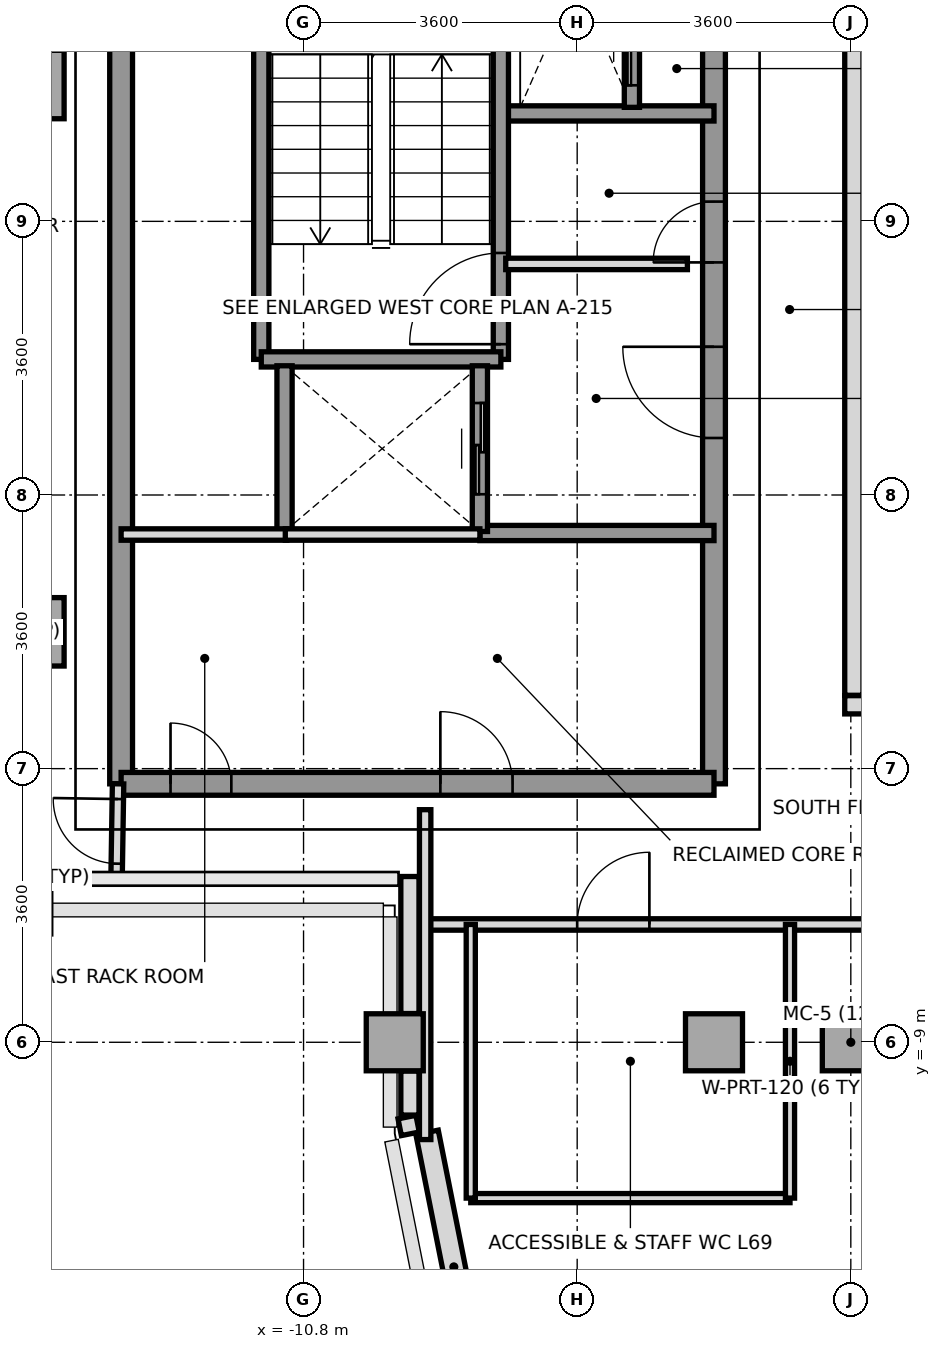
"""IFC4 building model, lengths in metres.
Left out: names, types, materials, properties, quantities, classifications, styles, units other than length and angle.
Written with IfcOpenShell. Run it as: python <this file> out.ifc"""

import sys

from ifc_helpers import new_model, si_unit, direction, frame, frame_2d, origin, origin_2d, place, context, subcontext, project, spatial, rectangle, extrude, source, transform, mapped, element, fill, save


model = new_model("IFC4")
c1 = context("Model", 3, precision=1e-05, world=origin(), true_north=direction((0.0, 1.0)))
c2 = subcontext(c1, "Body", "Model", "MODEL_VIEW")
j1 = project(units=[si_unit("LENGTHUNIT", "METRE"), si_unit("PLANEANGLEUNIT", "RADIAN")], contexts=[c1])
p1 = place(None, origin())
s1 = spatial("IfcSite", under=j1, at=p1, CompositionType="ELEMENT")
p2 = place(p1, origin())
s2 = spatial("IfcBuilding", under=s1, at=p2, CompositionType="ELEMENT")
p3 = place(p2, frame((0.0, 0.0, 249.2)))
s3 = spatial("IfcBuildingStorey", under=s2, at=p3, CompositionType="ELEMENT", Elevation=249.2)
m1 = source(origin(), c2, "Body", "SweptSolid", [
    extrude(rectangle(XDim=0.9, YDim=0.9, at=origin_2d()), origin(), (0.0, 0.0, 1.0), 3.01),
])
for number, where, z_axis, x_axis in (
    (1, (-14.4, -3.6, 0.0), (0.0, 0.0, 1.0), (1.0, 0.0, 0.0)),
    (2, (-14.4, 3.6, 0.0), (0.0, 0.0, 1.0), (1.0, 0.0, 0.0)),
):
    element("IfcColumn", number, at=place(p3, frame(where, z_axis=z_axis, x_axis=x_axis)), inside=s3, PredefinedType="COLUMN", context=c2, shape_type="MappedRepresentation", body=[
        mapped(m1, transform((0.0, 0.0, 0.0), x_axis=(1.0, 0.0, 0.0), y_axis=(0.0, 1.0, 0.0), z_axis=(0.0, 0.0, 1.0), scale=1.0)),
    ])
m2 = source(origin(), c2, "Body", "SweptSolid", [
    extrude(rectangle(XDim=0.75, YDim=0.75, at=origin_2d()), origin(), (0.0, 0.0, 1.0), 3.01),
])
for number, where, z_axis, x_axis in (
    (3, (-9.6, -9.0, 0.0), (0.0, 0.0, 1.0), (1.0, 0.0, 0.0)),
    (4, (-5.4, -9.0, 0.0), (0.0, 0.0, 1.0), (1.0, 0.0, 0.0)),
    (5, (-3.6, -9.0, 0.0), (0.0, 0.0, 1.0), (1.0, 0.0, 0.0)),
):
    element("IfcColumn", number, at=place(p3, frame(where, z_axis=z_axis, x_axis=x_axis)), inside=s3, PredefinedType="COLUMN", context=c2, shape_type="MappedRepresentation", body=[
        mapped(m2, transform((0.0, 0.0, 0.0), x_axis=(1.0, 0.0, 0.0), y_axis=(0.0, 1.0, 0.0), z_axis=(0.0, 0.0, 1.0), scale=1.0)),
    ])
p4 = place(p3, frame((-9.175, -10.185, 0.0), z_axis=(0.0, 0.0, 1.0), x_axis=(0.195114232679, -0.980780523974, 0.0)))
e6 = element("IfcWall", 6, at=p4, inside=s3, PredefinedType="SOLIDWALL", context=c2, shape_type="SweptSolid", body=[
    extrude(rectangle(XDim=3.609, YDim=0.3, at=frame_2d((1.804, 0.0))), origin(), (0.0, 0.0, 1.0), 3.01),
])
p5 = place(p3, frame((-9.395, -10.204, 0.0), z_axis=(0.0, 0.0, 1.0), x_axis=(-0.194859894132, 0.980831087221, 0.0)))
e7 = element("IfcWall", 7, at=p5, inside=s3, PredefinedType="PARAPET", context=c2, shape_type="SweptSolid", body=[
    extrude(rectangle(XDim=0.224, YDim=0.24, at=frame_2d((0.112, 0.0))), origin(), (0.0, 0.0, 1.0), 1.15),
])
p6 = place(p3, frame((-9.4, -9.958, 0.0), z_axis=(0.0, 0.0, 1.0), x_axis=(0.0, 1.0, 0.0)))
e8 = element("IfcWall", 8, at=p6, inside=s3, PredefinedType="PARAPET", context=c2, shape_type="SweptSolid", body=[
    extrude(rectangle(XDim=0.58, YDim=0.24, at=frame_2d((0.29, 0.0))), origin(), (0.0, 0.0, 1.0), 1.15),
])
p7 = place(p3, frame((-9.4, -8.622, 0.0), z_axis=(0.0, 0.0, 1.0), x_axis=(0.0, 1.0, 0.0)))
e9 = element("IfcWall", 9, at=p7, inside=s3, PredefinedType="PARAPET", context=c2, shape_type="SweptSolid", body=[
    extrude(rectangle(XDim=1.803, YDim=0.24, at=frame_2d((0.901, 0.0))), origin(), (0.0, 0.0, 1.0), 1.15),
])
p8 = place(p3, frame((-13.2, -5.6, 0.0), z_axis=(0.0, 0.0, 1.0), x_axis=(0.0, 1.0, 0.0)))
e10 = element("IfcWall", 10, at=p8, inside=s3, PredefinedType="SHEAR", context=c2, shape_type="SweptSolid", body=[
    extrude(rectangle(XDim=11.2, YDim=0.3, at=frame_2d((5.6, 0.0))), origin(), (0.0, 0.0, 1.0), 3.01),
])
p9 = place(p3, frame((-5.4, -5.6, 0.0), z_axis=(0.0, 0.0, 1.0), x_axis=(0.0, 1.0, 0.0)))
e11 = element("IfcWall", 11, at=p9, inside=s3, PredefinedType="SHEAR", context=c2, shape_type="SweptSolid", body=[
    extrude(rectangle(XDim=12.5, YDim=0.3, at=frame_2d((6.25, 0.0))), origin(), (0.0, 0.0, 1.0), 3.01),
])
p10 = place(p9, frame((4.55, 0.0, 0.0)))
e12 = element("IfcOpeningElement", 12, at=p10, cuts=e11, PredefinedType="OPENING", context=c2, shape_type="SweptSolid", body=[
    extrude(rectangle(XDim=1.2, YDim=2.2, at=frame_2d((0.6, 1.1))), frame((0.0, 0.16, 0.0), z_axis=(0.0, -1.0, 0.0), x_axis=(1.0, 0.0, 0.0)), (0.0, 0.0, 1.0), 0.32),
])
p11 = place(p9, frame((10.45, 0.0, 0.0)))
e13 = element("IfcOpeningElement", 13, at=p11, cuts=e11, PredefinedType="OPENING", context=c2, shape_type="SweptSolid", body=[
    extrude(rectangle(XDim=1.2, YDim=2.2, at=frame_2d((0.6, 1.1))), frame((0.0, 0.16, 0.0), z_axis=(0.0, -1.0, 0.0), x_axis=(1.0, 0.0, 0.0)), (0.0, 0.0, 1.0), 0.32),
])
p12 = place(p9, frame((6.86, 0.0, 0.0)))
e14 = element("IfcOpeningElement", 14, at=p12, cuts=e11, PredefinedType="OPENING", context=c2, shape_type="SweptSolid", body=[
    extrude(rectangle(XDim=0.8, YDim=2.1, at=frame_2d((0.4, 1.05))), frame((0.0, 0.16, 0.0), z_axis=(0.0, -1.0, 0.0), x_axis=(1.0, 0.0, 0.0)), (0.0, 0.0, 1.0), 0.32),
])
p13 = place(p3, frame((-13.2, -5.6, 0.0), z_axis=(0.0, 0.0, 1.0), x_axis=(1.0, 0.0, 0.0)))
e15 = element("IfcWall", 15, at=p13, inside=s3, PredefinedType="SHEAR", context=c2, shape_type="SweptSolid", body=[
    extrude(rectangle(XDim=7.8, YDim=0.3, at=frame_2d((3.9, 0.0))), origin(), (0.0, 0.0, 1.0), 3.01),
])
p14 = place(p13, frame((0.65, 0.0, 0.0)))
e16 = element("IfcOpeningElement", 16, at=p14, cuts=e15, PredefinedType="OPENING", context=c2, shape_type="SweptSolid", body=[
    extrude(rectangle(XDim=0.8, YDim=2.1, at=frame_2d((0.4, 1.05))), frame((0.0, 0.16, 0.0), z_axis=(0.0, -1.0, 0.0), x_axis=(1.0, 0.0, 0.0)), (0.0, 0.0, 1.0), 0.32),
])
p15 = place(p13, frame((4.2, 0.0, 0.0)))
e17 = element("IfcOpeningElement", 17, at=p15, cuts=e15, PredefinedType="OPENING", context=c2, shape_type="SweptSolid", body=[
    extrude(rectangle(XDim=0.95, YDim=2.15, at=frame_2d((0.475, 1.075))), frame((0.0, 0.16, 0.0), z_axis=(0.0, -1.0, 0.0), x_axis=(1.0, 0.0, 0.0)), (0.0, 0.0, 1.0), 0.32),
])
p16 = place(p3, frame((-8.18, 3.22, 0.0), z_axis=(0.0, 0.0, 1.0), x_axis=(1.0, 0.0, 0.0)))
e18 = element("IfcWall", 18, at=p16, inside=s3, PredefinedType="SOLIDWALL", context=c2, shape_type="SweptSolid", body=[
    extrude(rectangle(XDim=2.78, YDim=0.2, at=frame_2d((1.39, 0.0))), origin(), (0.0, 0.0, 1.0), 3.01),
])
p17 = place(p3, frame((-8.48, -2.3, 0.0), z_axis=(0.0, 0.0, 1.0), x_axis=(1.0, 0.0, 0.0)))
e19 = element("IfcWall", 19, at=p17, inside=s3, PredefinedType="SOLIDWALL", context=c2, shape_type="SweptSolid", body=[
    extrude(rectangle(XDim=3.08, YDim=0.2, at=frame_2d((1.54, 0.0))), origin(), (0.0, 0.0, 1.0), 3.01),
])
p18 = place(p3, frame((-8.204, -0.016, 0.0), z_axis=(0.0, 0.0, 1.0), x_axis=(0.0, 1.0, 0.0)))
e20 = element("IfcWall", 20, at=p18, inside=s3, PredefinedType="SOLIDWALL", context=c2, shape_type="SweptSolid", body=[
    extrude(rectangle(XDim=6.916, YDim=0.2, at=frame_2d((3.458, 0.0))), origin(), (0.0, 0.0, 1.0), 3.01),
])
p19 = place(p18, frame((0.2, 0.0, 0.0)))
e21 = element("IfcOpeningElement", 21, at=p19, cuts=e20, PredefinedType="OPENING", context=c2, shape_type="SweptSolid", body=[
    extrude(rectangle(XDim=1.2, YDim=2.2, at=frame_2d((0.6, 1.1))), frame((0.0, 0.11, 0.0), z_axis=(0.0, -1.0, 0.0), x_axis=(1.0, 0.0, 0.0)), (0.0, 0.0, 1.0), 0.22),
])
p20 = place(p3, frame((-11.356, -0.016, 0.0), z_axis=(0.0, 0.0, 1.0), x_axis=(0.0, 1.0, 0.0)))
e22 = element("IfcWall", 22, at=p20, inside=s3, PredefinedType="SOLIDWALL", context=c2, shape_type="SweptSolid", body=[
    extrude(rectangle(XDim=6.916, YDim=0.2, at=frame_2d((3.458, 0.0))), origin(), (0.0, 0.0, 1.0), 3.01),
])
p21 = place(p3, frame((-11.356, -0.016, 0.0), z_axis=(0.0, 0.0, 1.0), x_axis=(1.0, 0.0, 0.0)))
e23 = element("IfcWall", 23, at=p21, inside=s3, PredefinedType="SOLIDWALL", context=c2, shape_type="SweptSolid", body=[
    extrude(rectangle(XDim=3.152, YDim=0.2, at=frame_2d((1.576, 0.0))), origin(), (0.0, 0.0, 1.0), 3.01),
])
p22 = place(p3, frame((-11.05, -2.28, 0.0), z_axis=(0.0, 0.0, 1.0), x_axis=(0.0, 1.0, 0.0)))
e24 = element("IfcWall", 24, at=p22, inside=s3, PredefinedType="SOLIDWALL", context=c2, shape_type="SweptSolid", body=[
    extrude(rectangle(XDim=2.18, YDim=0.2, at=frame_2d((1.09, 0.0))), origin(), (0.0, 0.0, 1.0), 3.01),
])
p23 = place(p3, frame((-8.48, -2.28, 0.0), z_axis=(0.0, 0.0, 1.0), x_axis=(0.0, 1.0, 0.0)))
e25 = element("IfcWall", 25, at=p23, inside=s3, PredefinedType="SOLIDWALL", context=c2, shape_type="SweptSolid", body=[
    extrude(rectangle(XDim=2.18, YDim=0.2, at=frame_2d((1.09, 0.0))), origin(), (0.0, 0.0, 1.0), 3.01),
])
p24 = place(p23, frame((0.49, 0.0, 0.0)))
e26 = element("IfcOpeningElement", 26, at=p24, cuts=e25, PredefinedType="OPENING", context=c2, shape_type="SweptSolid", body=[
    extrude(rectangle(XDim=1.2, YDim=2.2, at=frame_2d((0.6, 1.1))), frame((0.0, 0.11, 0.0), z_axis=(0.0, -1.0, 0.0), x_axis=(1.0, 0.0, 0.0)), (0.0, 0.0, 1.0), 0.22),
])
p25 = place(p3, frame((-6.48, 3.3, 0.0), z_axis=(0.0, 0.0, 1.0), x_axis=(0.0, 1.0, 0.0)))
e27 = element("IfcWall", 27, at=p25, inside=s3, PredefinedType="SOLIDWALL", context=c2, shape_type="SweptSolid", body=[
    extrude(rectangle(XDim=1.68, YDim=0.2, at=frame_2d((0.84, 0.0))), origin(), (0.0, 0.0, 1.0), 3.01),
])
p26 = place(p25, frame((0.29, 0.0, 0.0)))
e28 = element("IfcOpeningElement", 28, at=p26, cuts=e27, PredefinedType="OPENING", context=c2, shape_type="SweptSolid", body=[
    extrude(rectangle(XDim=1.1, YDim=2.2, at=frame_2d((0.55, 1.1))), frame((0.0, 0.11, 0.0), z_axis=(0.0, -1.0, 0.0), x_axis=(1.0, 0.0, 0.0)), (0.0, 0.0, 1.0), 0.22),
])
p27 = place(p3, frame((-8.14, 1.24, 0.0), z_axis=(0.0, 0.0, 1.0), x_axis=(1.0, 0.0, 0.0)))
e29 = element("IfcWall", 29, at=p27, inside=s3, PredefinedType="PARTITIONING", context=c2, shape_type="SweptSolid", body=[
    extrude(rectangle(XDim=2.39, YDim=0.15, at=frame_2d((1.195, 0.0))), origin(), (0.0, 0.0, 1.0), 3.01),
])
p28 = place(p3, frame((-13.2, -2.32, 0.0), z_axis=(0.0, 0.0, 1.0), x_axis=(1.0, 0.0, 0.0)))
e30 = element("IfcWall", 30, at=p28, inside=s3, PredefinedType="PARTITIONING", context=c2, shape_type="SweptSolid", body=[
    extrude(rectangle(XDim=2.18, YDim=0.15, at=frame_2d((1.09, 0.0))), origin(), (0.0, 0.0, 1.0), 3.01),
])
p29 = place(p3, frame((-11.04, -2.32, 0.0), z_axis=(0.0, 0.0, 1.0), x_axis=(1.0, 0.0, 0.0)))
e31 = element("IfcWall", 31, at=p29, inside=s3, PredefinedType="PARTITIONING", context=c2, shape_type="SweptSolid", body=[
    extrude(rectangle(XDim=2.56, YDim=0.15, at=frame_2d((1.28, 0.0))), origin(), (0.0, 0.0, 1.0), 3.01),
])
p30 = place(p3, frame((-9.2, -7.45, 0.0), z_axis=(0.0, 0.0, 1.0), x_axis=(1.0, 0.0, 0.0)))
e32 = element("IfcWall", 32, at=p30, inside=s3, PredefinedType="PARTITIONING", context=c2, shape_type="SweptSolid", body=[
    extrude(rectangle(XDim=18.4, YDim=0.15, at=frame_2d((9.2, 0.0))), origin(), (0.0, 0.0, 1.0), 2.57),
])
p31 = place(p30, frame((2.0, 0.0, 0.0)))
e33 = element("IfcOpeningElement", 33, at=p31, cuts=e32, PredefinedType="OPENING", context=c2, shape_type="SweptSolid", body=[
    extrude(rectangle(XDim=0.95, YDim=2.15, at=frame_2d((0.475, 1.075))), frame((0.0, 0.085, 0.0), z_axis=(0.0, -1.0, 0.0), x_axis=(1.0, 0.0, 0.0)), (0.0, 0.0, 1.0), 0.17),
])
p32 = place(p30, frame((10.8, 0.0, 0.0)))
e34 = element("IfcOpeningElement", 34, at=p32, cuts=e32, PredefinedType="OPENING", context=c2, shape_type="SweptSolid", body=[
    extrude(rectangle(XDim=1.1, YDim=2.2, at=frame_2d((0.55, 1.1))), frame((0.0, 0.085, 0.0), z_axis=(0.0, -1.0, 0.0), x_axis=(1.0, 0.0, 0.0)), (0.0, 0.0, 1.0), 0.17),
])
p33 = place(p3, frame((-9.2, -10.28, 0.0), z_axis=(0.0, 0.0, 1.0), x_axis=(0.0, 1.0, 0.0)))
e35 = element("IfcWall", 35, at=p33, inside=s3, PredefinedType="PARTITIONING", context=c2, shape_type="SweptSolid", body=[
    extrude(rectangle(XDim=4.34, YDim=0.15, at=frame_2d((2.17, 0.0))), origin(), (0.0, 0.0, 1.0), 2.61),
])
p34 = place(p3, frame((-8.6, -11.05, 0.0), z_axis=(0.0, 0.0, 1.0), x_axis=(1.0, 0.0, 0.0)))
e36 = element("IfcWall", 36, at=p34, inside=s3, PredefinedType="PARTITIONING", context=c2, shape_type="SweptSolid", body=[
    extrude(rectangle(XDim=4.2, YDim=0.12, at=frame_2d((2.1, 0.0))), origin(), (0.0, 0.0, 1.0), 3.01),
])
for number, where, z_axis, x_axis in (
    (37, (-8.6, -11.05, 0.0), (0.0, 0.0, 1.0), (0.0, 1.0, 0.0)),
    (38, (-4.4, -11.05, 0.0), (0.0, 0.0, 1.0), (0.0, 1.0, 0.0)),
):
    element("IfcWall", number, at=place(p3, frame(where, z_axis=z_axis, x_axis=x_axis)), inside=s3, PredefinedType="PARTITIONING", context=c2, shape_type="SweptSolid", body=[
        extrude(rectangle(XDim=3.6, YDim=0.12, at=frame_2d((1.8, 0.0))), origin(), (0.0, 0.0, 1.0), 2.61),
    ])
p35 = place(p3, frame((-13.26, -6.85, 0.0), z_axis=(0.0, 0.0, 1.0), x_axis=(0.016013571389, 0.999871774545, 0.0)))
e39 = element("IfcWall", 39, at=p35, inside=s3, PredefinedType="PARTITIONING", context=c2, shape_type="SweptSolid", body=[
    extrude(rectangle(XDim=1.25, YDim=0.15, at=frame_2d((0.625, 0.0))), origin(), (0.0, 0.0, 1.0), 3.01),
])
p36 = place(p35, frame((0.2, 0.0, 0.0)))
e40 = element("IfcOpeningElement", 40, at=p36, cuts=e39, PredefinedType="OPENING", context=c2, shape_type="SweptSolid", body=[
    extrude(rectangle(XDim=0.85, YDim=2.1, at=frame_2d((0.425, 1.05))), frame((0.0, 0.085, 0.0), z_axis=(0.0, -1.0, 0.0), x_axis=(1.0, 0.0, 0.0)), (0.0, 0.0, 1.0), 0.17),
])
p37 = place(p3, frame((-3.68, -4.56, 0.0), z_axis=(0.0, 0.0, 1.0), x_axis=(1.0, 0.0, 0.0)))
e41 = element("IfcWall", 41, at=p37, inside=s3, PredefinedType="PARAPET", context=c2, shape_type="SweptSolid", body=[
    extrude(rectangle(XDim=7.36, YDim=0.24, at=frame_2d((3.68, 0.0))), origin(), (0.0, 0.0, 1.0), 1.15),
])
p38 = place(p3, frame((-3.56, -4.435, 0.0), z_axis=(0.0, 0.0, 1.0), x_axis=(0.0, 1.0, 0.0)))
e42 = element("IfcWall", 42, at=p38, inside=s3, PredefinedType="PARAPET", context=c2, shape_type="SweptSolid", body=[
    extrude(rectangle(XDim=8.87, YDim=0.24, at=frame_2d((4.435, 0.0))), origin(), (0.0, 0.0, 1.0), 1.15),
])
m3 = source(origin(), c2, "Body", "SweptSolid", [
    extrude(rectangle(XDim=1.2, YDim=2.2, at=frame_2d((0.6, 1.1))), frame((0.0, 0.025, 0.0), z_axis=(0.0, -1.0, 0.0), x_axis=(1.0, 0.0, 0.0)), (0.0, 0.0, 1.0), 0.05),
])
p39 = place(p19, origin())
e43 = element("IfcDoor", 43, at=p39, inside=s3, OperationType="SINGLE_SWING_LEFT", PredefinedType="DOOR", context=c2, shape_type="MappedRepresentation", body=[
    mapped(m3, transform((0.0, 0.0, 0.0), x_axis=(1.0, 0.0, 0.0), y_axis=(0.0, 1.0, 0.0), z_axis=(0.0, 0.0, 1.0), scale=1.0)),
])
fill(e21, e43)
p40 = place(p10, origin())
e44 = element("IfcDoor", 44, at=p40, inside=s3, OperationType="SINGLE_SWING_RIGHT", PredefinedType="DOOR", context=c2, shape_type="MappedRepresentation", body=[
    mapped(m3, transform((0.0, 0.0, 0.0), x_axis=(1.0, 0.0, 0.0), y_axis=(0.0, 1.0, 0.0), z_axis=(0.0, 0.0, 1.0), scale=1.0)),
])
fill(e12, e44)
m4 = source(origin(), c2, "Body", "SweptSolid", [
    extrude(rectangle(XDim=0.8, YDim=2.1, at=frame_2d((0.4, 1.05))), frame((0.0, 0.025, 0.0), z_axis=(0.0, -1.0, 0.0), x_axis=(1.0, 0.0, 0.0)), (0.0, 0.0, 1.0), 0.05),
])
p41 = place(p12, origin())
e45 = element("IfcDoor", 45, at=p41, inside=s3, OperationType="SINGLE_SWING_LEFT", PredefinedType="DOOR", context=c2, shape_type="MappedRepresentation", body=[
    mapped(m4, transform((0.0, 0.0, 0.0), x_axis=(1.0, 0.0, 0.0), y_axis=(0.0, 1.0, 0.0), z_axis=(0.0, 0.0, 1.0), scale=1.0)),
])
fill(e14, e45)
p42 = place(p14, origin())
e46 = element("IfcDoor", 46, at=p42, inside=s3, OperationType="SINGLE_SWING_LEFT", PredefinedType="DOOR", context=c2, shape_type="MappedRepresentation", body=[
    mapped(m4, transform((0.0, 0.0, 0.0), x_axis=(1.0, 0.0, 0.0), y_axis=(0.0, 1.0, 0.0), z_axis=(0.0, 0.0, 1.0), scale=1.0)),
])
fill(e16, e46)
m5 = source(origin(), c2, "Body", "SweptSolid", [
    extrude(rectangle(XDim=0.95, YDim=2.15, at=frame_2d((0.475, 1.075))), frame((0.0, 0.025, 0.0), z_axis=(0.0, -1.0, 0.0), x_axis=(1.0, 0.0, 0.0)), (0.0, 0.0, 1.0), 0.05),
])
p43 = place(p15, origin())
e47 = element("IfcDoor", 47, at=p43, inside=s3, OperationType="SINGLE_SWING_LEFT", PredefinedType="DOOR", context=c2, shape_type="MappedRepresentation", body=[
    mapped(m5, transform((0.0, 0.0, 0.0), x_axis=(1.0, 0.0, 0.0), y_axis=(0.0, 1.0, 0.0), z_axis=(0.0, 0.0, 1.0), scale=1.0)),
])
fill(e17, e47)
p44 = place(p24, origin())
e48 = element("IfcDoor", 48, at=p44, inside=s3, OperationType="SLIDING_TO_RIGHT", PredefinedType="DOOR", context=c2, shape_type="MappedRepresentation", body=[
    mapped(m3, transform((0.0, 0.0, 0.0), x_axis=(1.0, 0.0, 0.0), y_axis=(0.0, 1.0, 0.0), z_axis=(0.0, 0.0, 1.0), scale=1.0)),
])
fill(e26, e48)
m6 = source(origin(), c2, "Body", "SweptSolid", [
    extrude(rectangle(XDim=1.1, YDim=2.2, at=frame_2d((0.55, 1.1))), frame((0.0, 0.025, 0.0), z_axis=(0.0, -1.0, 0.0), x_axis=(1.0, 0.0, 0.0)), (0.0, 0.0, 1.0), 0.05),
])
p45 = place(p26, origin())
e49 = element("IfcDoor", 49, at=p45, inside=s3, OperationType="SLIDING_TO_LEFT", PredefinedType="DOOR", context=c2, shape_type="MappedRepresentation", body=[
    mapped(m6, transform((0.0, 0.0, 0.0), x_axis=(1.0, 0.0, 0.0), y_axis=(0.0, 1.0, 0.0), z_axis=(0.0, 0.0, 1.0), scale=1.0)),
])
fill(e28, e49)
p46 = place(p31, origin())
e50 = element("IfcDoor", 50, at=p46, inside=s3, OperationType="SINGLE_SWING_RIGHT", PredefinedType="DOOR", context=c2, shape_type="MappedRepresentation", body=[
    mapped(m5, transform((0.0, 0.0, 0.0), x_axis=(1.0, 0.0, 0.0), y_axis=(0.0, 1.0, 0.0), z_axis=(0.0, 0.0, 1.0), scale=1.0)),
])
fill(e33, e50)
m7 = source(origin(), c2, "Body", "SweptSolid", [
    extrude(rectangle(XDim=0.85, YDim=2.1, at=frame_2d((0.425, 1.05))), frame((0.0, 0.025, 0.0), z_axis=(0.0, -1.0, 0.0), x_axis=(1.0, 0.0, 0.0)), (0.0, 0.0, 1.0), 0.05),
])
p47 = place(p36, origin())
e51 = element("IfcDoor", 51, at=p47, inside=s3, OperationType="SINGLE_SWING_RIGHT", PredefinedType="DOOR", context=c2, shape_type="MappedRepresentation", body=[
    mapped(m7, transform((0.0, 0.0, 0.0), x_axis=(1.0, 0.0, 0.0), y_axis=(0.0, 1.0, 0.0), z_axis=(0.0, 0.0, 1.0), scale=1.0)),
])
fill(e40, e51)
save(model, sys.argv[1])
